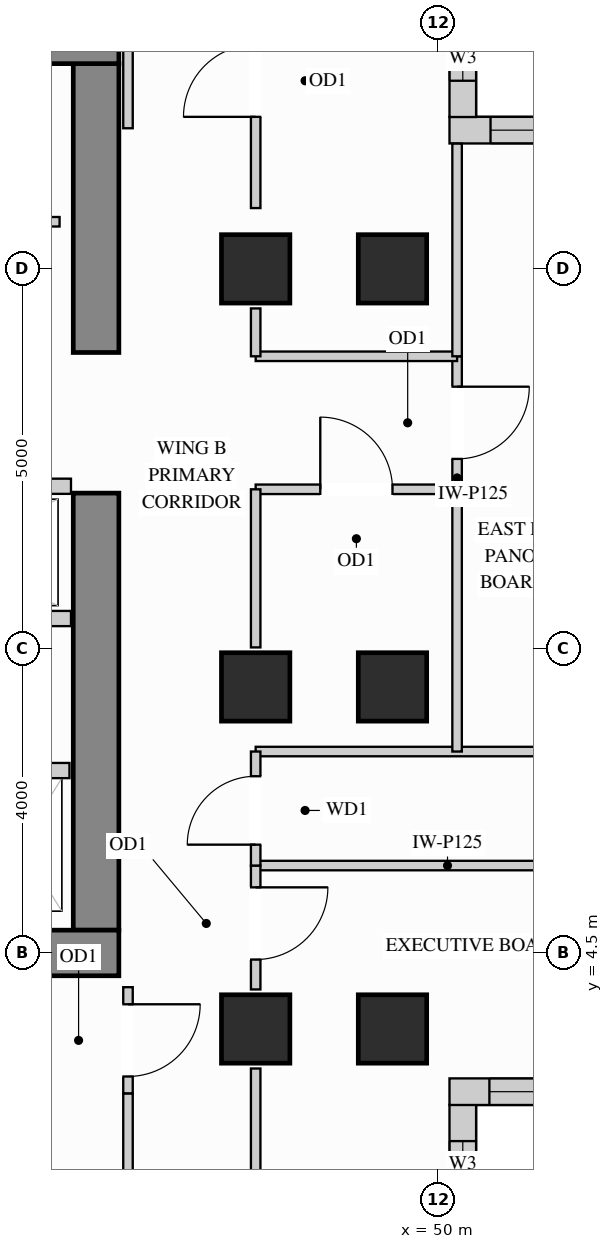
"""IFC4 building model, lengths in metres.
Left out: names, types, materials, properties, quantities, classifications, styles, units other than length and angle.
Written with IfcOpenShell. Run it as: python <this file> out.ifc"""

import sys

from ifc_helpers import new_model, si_unit, direction, frame, frame_2d, origin, origin_2d, place, context, subcontext, project, spatial, rectangle, extrude, source, transform, mapped, element, fill, save


model = new_model("IFC4")
c1 = context("Model", 3, precision=1e-05, world=origin(), true_north=direction((0.0, 1.0)))
c2 = subcontext(c1, "Body", "Model", "MODEL_VIEW")
j1 = project(units=[si_unit("LENGTHUNIT", "METRE"), si_unit("PLANEANGLEUNIT", "RADIAN")], contexts=[c1])
p1 = place(None, origin())
s1 = spatial("IfcSite", under=j1, at=p1, CompositionType="ELEMENT")
p2 = place(p1, origin())
s2 = spatial("IfcBuilding", under=s1, at=p2, CompositionType="ELEMENT")
p3 = place(p2, frame((0.0, 0.0, 146.7)))
s3 = spatial("IfcBuildingStorey", under=s2, at=p3, CompositionType="ELEMENT", Elevation=146.7)
m1 = source(origin(), c2, "Body", "SweptSolid", [
    extrude(rectangle(XDim=0.9, YDim=0.9, at=origin_2d()), origin(), (0.0, 0.0, 1.0), 3.4),
])
for number, where, z_axis, x_axis in (
    (1, (47.6, 13.5, 0.0), (0.0, 0.0, 1.0), (1.0, 0.0, 0.0)),
    (2, (47.6, 3.5, 0.0), (0.0, 0.0, 1.0), (1.0, 0.0, 0.0)),
    (3, (47.6, 8.0, 0.0), (0.0, 0.0, 1.0), (1.0, 0.0, 0.0)),
    (4, (49.4, 13.5, 0.0), (0.0, 0.0, 1.0), (1.0, 0.0, 0.0)),
    (5, (49.4, 3.5, 0.0), (0.0, 0.0, 1.0), (1.0, 0.0, 0.0)),
    (6, (49.4, 8.0, 0.0), (0.0, 0.0, 1.0), (1.0, 0.0, 0.0)),
):
    element("IfcColumn", number, at=place(p3, frame(where, z_axis=z_axis, x_axis=x_axis)), inside=s3, PredefinedType="COLUMN", context=c2, shape_type="MappedRepresentation", body=[
        mapped(m1, transform((0.0, 0.0, 0.0), x_axis=(1.0, 0.0, 0.0), y_axis=(0.0, 1.0, 0.0), z_axis=(0.0, 0.0, 1.0))),
    ])
m2 = source(origin(), c2, "Body", "SweptSolid", [
    extrude(rectangle(XDim=5.75, YDim=0.6, at=frame_2d((2.875, 0.0))), origin(), (0.0, 0.0, 1.0), 3.4),
])
p4 = place(p3, frame((45.5, 4.8, 0.0), z_axis=(0.0, 0.0, 1.0), x_axis=(0.0, 1.0, 0.0)))
e7 = element("IfcWall", 7, at=p4, inside=s3, PredefinedType="SHEAR", context=c2, shape_type="MappedRepresentation", body=[
    mapped(m2, transform((0.0, 0.0, 0.0), x_axis=(1.0, 0.0, 0.0), y_axis=(0.0, 1.0, 0.0), z_axis=(0.0, 0.0, 1.0))),
])
m3 = source(origin(), c2, "Body", "SweptSolid", [
    extrude(rectangle(XDim=3.8, YDim=0.6, at=frame_2d((1.9, 0.0))), origin(), (0.0, 0.0, 1.0), 3.4),
])
p5 = place(p3, frame((45.5, 12.4, 0.0), z_axis=(0.0, 0.0, 1.0), x_axis=(0.0, 1.0, 0.0)))
e8 = element("IfcWall", 8, at=p5, inside=s3, PredefinedType="SHEAR", context=c2, shape_type="MappedRepresentation", body=[
    mapped(m3, transform((0.0, 0.0, 0.0), x_axis=(1.0, 0.0, 0.0), y_axis=(0.0, 1.0, 0.0), z_axis=(0.0, 0.0, 1.0))),
])
m4 = source(origin(), c2, "Body", "SweptSolid", [
    extrude(rectangle(XDim=10.1, YDim=0.6, at=frame_2d((5.05, 0.0))), origin(), (0.0, 0.0, 1.0), 3.4),
])
for number, where, z_axis, x_axis in (
    (9, (35.7, 16.5, 0.0), (0.0, 0.0, 1.0), (1.0, 0.0, 0.0)),
    (10, (35.7, 4.5, 0.0), (0.0, 0.0, 1.0), (1.0, 0.0, 0.0)),
):
    element("IfcWall", number, at=place(p3, frame(where, z_axis=z_axis, x_axis=x_axis)), inside=s3, PredefinedType="SHEAR", context=c2, shape_type="MappedRepresentation", body=[
        mapped(m4, transform((0.0, 0.0, 0.0), x_axis=(1.0, 0.0, 0.0), y_axis=(0.0, 1.0, 0.0), z_axis=(0.0, 0.0, 1.0))),
    ])
p6 = place(p3, frame((50.325, 0.348, 0.0), z_axis=(0.0, 0.0, 1.0), x_axis=(0.0, 1.0, 0.0)))
e11 = element("IfcWall", 11, at=p6, inside=s3, PredefinedType="SOLIDWALL", context=c2, shape_type="SweptSolid", body=[
    extrude(rectangle(XDim=2.154, YDim=0.35, at=frame_2d((1.077, 0.0))), origin(), (0.0, 0.0, 1.0), 3.385),
])
p7 = place(p6, frame((0.477, 0.0, 0.78)))
e12 = element("IfcOpeningElement", 12, at=p7, cuts=e11, PredefinedType="OPENING", context=c2, shape_type="SweptSolid", body=[
    extrude(rectangle(XDim=1.2, YDim=2.1, at=frame_2d((0.6, 1.05))), frame((0.0, 0.185, 0.0), z_axis=(0.0, -1.0, 0.0), x_axis=(1.0, 0.0, 0.0)), (0.0, 0.0, 1.0), 0.37),
])
p8 = place(p3, frame((50.15, 2.675, 0.0), z_axis=(0.0, 0.0, 1.0), x_axis=(1.0, 0.0, 0.0)))
e13 = element("IfcWall", 13, at=p8, inside=s3, PredefinedType="SOLIDWALL", context=c2, shape_type="SweptSolid", body=[
    extrude(rectangle(XDim=2.85, YDim=0.35, at=frame_2d((1.425, 0.0))), origin(), (0.0, 0.0, 1.0), 3.385),
])
p9 = place(p8, frame((0.525, 0.0, 0.78)))
e14 = element("IfcOpeningElement", 14, at=p9, cuts=e13, PredefinedType="OPENING", context=c2, shape_type="SweptSolid", body=[
    extrude(rectangle(XDim=1.8, YDim=2.1, at=frame_2d((0.9, 1.05))), frame((0.0, 0.185, 0.0), z_axis=(0.0, -1.0, 0.0), x_axis=(1.0, 0.0, 0.0)), (0.0, 0.0, 1.0), 0.37),
])
p10 = place(p3, frame((53.0, 15.325, 0.0), z_axis=(0.0, 0.0, 1.0), x_axis=(-1.0, 0.0, 0.0)))
e15 = element("IfcWall", 15, at=p10, inside=s3, PredefinedType="SOLIDWALL", context=c2, shape_type="SweptSolid", body=[
    extrude(rectangle(XDim=2.85, YDim=0.35, at=frame_2d((1.425, 0.0))), origin(), (0.0, 0.0, 1.0), 3.385),
])
p11 = place(p10, frame((0.51, 0.0, 0.78)))
e16 = element("IfcOpeningElement", 16, at=p11, cuts=e15, PredefinedType="OPENING", context=c2, shape_type="SweptSolid", body=[
    extrude(rectangle(XDim=1.8, YDim=2.1, at=frame_2d((0.9, 1.05))), frame((0.0, 0.185, 0.0), z_axis=(0.0, -1.0, 0.0), x_axis=(1.0, 0.0, 0.0)), (0.0, 0.0, 1.0), 0.37),
])
p12 = place(p3, frame((50.325, 15.498, 0.0), z_axis=(0.0, 0.0, 1.0), x_axis=(0.0, 1.0, 0.0)))
e17 = element("IfcWall", 17, at=p12, inside=s3, PredefinedType="SOLIDWALL", context=c2, shape_type="SweptSolid", body=[
    extrude(rectangle(XDim=2.154, YDim=0.35, at=frame_2d((1.077, 0.0))), origin(), (0.0, 0.0, 1.0), 3.385),
])
p13 = place(p12, frame((0.477, 0.0, 0.78)))
e18 = element("IfcOpeningElement", 18, at=p13, cuts=e17, PredefinedType="OPENING", context=c2, shape_type="SweptSolid", body=[
    extrude(rectangle(XDim=1.2, YDim=2.1, at=frame_2d((0.6, 1.05))), frame((0.0, 0.185, 0.0), z_axis=(0.0, -1.0, 0.0), x_axis=(1.0, 0.0, 0.0)), (0.0, 0.0, 1.0), 0.37),
])
p14 = place(p3, frame((36.5, 14.12, 0.0), z_axis=(0.0, 0.0, 1.0), x_axis=(1.0, 0.0, 0.0)))
e19 = element("IfcWall", 19, at=p14, inside=s3, PredefinedType="PARTITIONING", context=c2, shape_type="SweptSolid", body=[
    extrude(rectangle(XDim=8.52, YDim=0.125, at=frame_2d((4.26, 0.0))), origin(), (0.0, 0.0, 1.0), 3.385),
])
p15 = place(p14, frame((3.785, 0.0, 0.0)))
e20 = element("IfcOpeningElement", 20, at=p15, cuts=e19, PredefinedType="OPENING", context=c2, shape_type="SweptSolid", body=[
    extrude(rectangle(XDim=0.95, YDim=2.15, at=frame_2d((0.475, 1.075))), frame((0.0, 0.073, 0.0), z_axis=(0.0, -1.0, 0.0), x_axis=(1.0, 0.0, 0.0)), (0.0, 0.0, 1.0), 0.145),
])
p16 = place(p3, frame((50.25, 10.6, 0.0), z_axis=(0.0, 0.0, 1.0), x_axis=(0.0, 1.0, 0.0)))
e21 = element("IfcWall", 21, at=p16, inside=s3, PredefinedType="PARTITIONING", context=c2, shape_type="SweptSolid", body=[
    extrude(rectangle(XDim=1.75, YDim=0.125, at=frame_2d((0.875, 0.0))), origin(), (0.0, 0.0, 1.0), 3.385),
])
p17 = place(p16, frame((0.4, 0.0, 0.0)))
e22 = element("IfcOpeningElement", 22, at=p17, cuts=e21, PredefinedType="OPENING", context=c2, shape_type="SweptSolid", body=[
    extrude(rectangle(XDim=0.95, YDim=2.15, at=frame_2d((0.475, 1.075))), frame((0.0, 0.073, 0.0), z_axis=(0.0, -1.0, 0.0), x_axis=(1.0, 0.0, 0.0)), (0.0, 0.0, 1.0), 0.145),
])
m5 = source(origin(), c2, "Body", "SweptSolid", [
    extrude(rectangle(XDim=5.048, YDim=0.125, at=frame_2d((2.524, 0.0))), origin(), (0.0, 0.0, 1.0), 3.385),
])
for number, where, z_axis, x_axis in (
    (23, (47.6, 5.65, 0.0), (0.0, 0.0, 1.0), (1.0, 0.0, 0.0)),
    (24, (47.6, 7.15, 0.0), (0.0, 0.0, 1.0), (1.0, 0.0, 0.0)),
):
    element("IfcWall", number, at=place(p3, frame(where, z_axis=z_axis, x_axis=x_axis)), inside=s3, PredefinedType="PARTITIONING", context=c2, shape_type="MappedRepresentation", body=[
        mapped(m5, transform((0.0, 0.0, 0.0), x_axis=(1.0, 0.0, 0.0), y_axis=(0.0, 1.0, 0.0), z_axis=(0.0, 0.0, 1.0))),
    ])
m6 = source(origin(), c2, "Body", "SweptSolid", [
    extrude(rectangle(XDim=2.65, YDim=0.125, at=frame_2d((1.325, 0.0))), origin(), (0.0, 0.0, 1.0), 3.385),
])
p18 = place(p3, frame((47.6, 12.35, 0.0), z_axis=(0.0, 0.0, 1.0), x_axis=(1.0, 0.0, 0.0)))
e25 = element("IfcWall", 25, at=p18, inside=s3, PredefinedType="PARTITIONING", context=c2, shape_type="MappedRepresentation", body=[
    mapped(m6, transform((0.0, 0.0, 0.0), x_axis=(1.0, 0.0, 0.0), y_axis=(0.0, 1.0, 0.0), z_axis=(0.0, 0.0, 1.0))),
])
p19 = place(p3, frame((47.6, 10.6, 0.0), z_axis=(0.0, 0.0, 1.0), x_axis=(1.0, 0.0, 0.0)))
e26 = element("IfcWall", 26, at=p19, inside=s3, PredefinedType="PARTITIONING", context=c2, shape_type="SweptSolid", body=[
    extrude(rectangle(XDim=2.65, YDim=0.125, at=frame_2d((1.325, 0.0))), origin(), (0.0, 0.0, 1.0), 2.773),
])
p20 = place(p19, frame((0.85, 0.0, 0.0)))
e27 = element("IfcOpeningElement", 27, at=p20, cuts=e26, PredefinedType="OPENING", context=c2, shape_type="SweptSolid", body=[
    extrude(rectangle(XDim=0.95, YDim=2.15, at=frame_2d((0.475, 1.075))), frame((0.0, 0.073, 0.0), z_axis=(0.0, -1.0, 0.0), x_axis=(1.0, 0.0, 0.0)), (0.0, 0.0, 1.0), 0.145),
])
m7 = source(origin(), c2, "Body", "SweptSolid", [
    extrude(rectangle(XDim=3.45, YDim=0.125, at=frame_2d((1.725, 0.0))), origin(), (0.0, 0.0, 1.0), 3.385),
])
p21 = place(p3, frame((50.25, 7.15, 0.0), z_axis=(0.0, 0.0, 1.0), x_axis=(0.0, 1.0, 0.0)))
e28 = element("IfcWall", 28, at=p21, inside=s3, PredefinedType="PARTITIONING", context=c2, shape_type="MappedRepresentation", body=[
    mapped(m7, transform((0.0, 0.0, 0.0), x_axis=(1.0, 0.0, 0.0), y_axis=(0.0, 1.0, 0.0), z_axis=(0.0, 0.0, 1.0))),
])
m8 = source(origin(), c2, "Body", "SweptSolid", [
    extrude(rectangle(XDim=2.798, YDim=0.125, at=frame_2d((1.399, 0.0))), origin(), (0.0, 0.0, 1.0), 3.385),
])
p22 = place(p3, frame((50.25, 12.35, 0.0), z_axis=(0.0, 0.0, 1.0), x_axis=(0.0, 1.0, 0.0)))
e29 = element("IfcWall", 29, at=p22, inside=s3, PredefinedType="PARTITIONING", context=c2, shape_type="MappedRepresentation", body=[
    mapped(m8, transform((0.0, 0.0, 0.0), x_axis=(1.0, 0.0, 0.0), y_axis=(0.0, 1.0, 0.0), z_axis=(0.0, 0.0, 1.0))),
])
p23 = place(p3, frame((47.6, 4.02, 0.0), z_axis=(0.0, 0.0, 1.0), x_axis=(0.0, 1.0, 0.0)))
e30 = element("IfcWall", 30, at=p23, inside=s3, PredefinedType="PARTITIONING", context=c2, shape_type="SweptSolid", body=[
    extrude(rectangle(XDim=1.63, YDim=0.125, at=frame_2d((0.815, 0.0))), origin(), (0.0, 0.0, 1.0), 2.773),
])
p24 = place(p23, frame((0.393, 0.0, 0.0)))
e31 = element("IfcOpeningElement", 31, at=p24, cuts=e30, PredefinedType="OPENING", context=c2, shape_type="SweptSolid", body=[
    extrude(rectangle(XDim=0.95, YDim=2.15, at=frame_2d((0.475, 1.075))), frame((0.0, 0.073, 0.0), z_axis=(0.0, -1.0, 0.0), x_axis=(1.0, 0.0, 0.0)), (0.0, 0.0, 1.0), 0.145),
])
m9 = source(origin(), c2, "Body", "SweptSolid", [
    extrude(rectangle(XDim=1.86, YDim=0.125, at=frame_2d((0.93, 0.0))), origin(), (0.0, 0.0, 1.0), 2.773),
])
p25 = place(p3, frame((47.6, 1.12, 0.0), z_axis=(0.0, 0.0, 1.0), x_axis=(0.0, 1.0, 0.0)))
e32 = element("IfcWall", 32, at=p25, inside=s3, PredefinedType="PARTITIONING", context=c2, shape_type="MappedRepresentation", body=[
    mapped(m9, transform((0.0, 0.0, 0.0), x_axis=(1.0, 0.0, 0.0), y_axis=(0.0, 1.0, 0.0), z_axis=(0.0, 0.0, 1.0))),
])
m10 = source(origin(), c2, "Body", "SweptSolid", [
    extrude(rectangle(XDim=2.08, YDim=0.125, at=frame_2d((1.04, 0.0))), origin(), (0.0, 0.0, 1.0), 2.773),
])
p26 = place(p3, frame((47.6, 8.52, 0.0), z_axis=(0.0, 0.0, 1.0), x_axis=(0.0, 1.0, 0.0)))
e33 = element("IfcWall", 33, at=p26, inside=s3, PredefinedType="PARTITIONING", context=c2, shape_type="MappedRepresentation", body=[
    mapped(m10, transform((0.0, 0.0, 0.0), x_axis=(1.0, 0.0, 0.0), y_axis=(0.0, 1.0, 0.0), z_axis=(0.0, 0.0, 1.0))),
])
p27 = place(p3, frame((47.6, 14.3, 0.0), z_axis=(0.0, 0.0, 1.0), x_axis=(0.0, 1.0, 0.0)))
e34 = element("IfcWall", 34, at=p27, inside=s3, PredefinedType="PARTITIONING", context=c2, shape_type="SweptSolid", body=[
    extrude(rectangle(XDim=2.58, YDim=0.125, at=frame_2d((1.29, 0.0))), origin(), (0.0, 0.0, 1.0), 2.773),
])
p28 = place(p27, frame((1.2, 0.0, 0.0)))
e35 = element("IfcOpeningElement", 35, at=p28, cuts=e34, PredefinedType="OPENING", context=c2, shape_type="SweptSolid", body=[
    extrude(rectangle(XDim=0.95, YDim=2.15, at=frame_2d((0.475, 1.075))), frame((0.0, 0.073, 0.0), z_axis=(0.0, -1.0, 0.0), x_axis=(1.0, 0.0, 0.0)), (0.0, 0.0, 1.0), 0.145),
])
m11 = source(origin(), c2, "Body", "SweptSolid", [
    extrude(rectangle(XDim=0.63, YDim=0.125, at=frame_2d((0.315, 0.0))), origin(), (0.0, 0.0, 1.0), 2.773),
])
p29 = place(p3, frame((47.6, 12.35, 0.0), z_axis=(0.0, 0.0, 1.0), x_axis=(0.0, 1.0, 0.0)))
e36 = element("IfcWall", 36, at=p29, inside=s3, PredefinedType="PARTITIONING", context=c2, shape_type="MappedRepresentation", body=[
    mapped(m11, transform((0.0, 0.0, 0.0), x_axis=(1.0, 0.0, 0.0), y_axis=(0.0, 1.0, 0.0), z_axis=(0.0, 0.0, 1.0))),
])
p30 = place(p3, frame((47.6, 5.65, 0.0), z_axis=(0.0, 0.0, 1.0), x_axis=(0.0, 1.0, 0.0)))
e37 = element("IfcWall", 37, at=p30, inside=s3, PredefinedType="PARTITIONING", context=c2, shape_type="SweptSolid", body=[
    extrude(rectangle(XDim=1.5, YDim=0.125, at=frame_2d((0.75, 0.0))), origin(), (0.0, 0.0, 1.0), 2.773),
])
p31 = place(p30, frame((0.275, 0.0, 0.0)))
e38 = element("IfcOpeningElement", 38, at=p31, cuts=e37, PredefinedType="OPENING", context=c2, shape_type="SweptSolid", body=[
    extrude(rectangle(XDim=0.9, YDim=2.15, at=frame_2d((0.45, 1.075))), frame((0.0, 0.073, 0.0), z_axis=(0.0, -1.0, 0.0), x_axis=(1.0, 0.0, 0.0)), (0.0, 0.0, 1.0), 0.145),
])
m12 = source(origin(), c2, "Body", "SweptSolid", [
    extrude(rectangle(XDim=2.298, YDim=0.125, at=frame_2d((1.149, 0.0))), origin(), (0.0, 0.0, 1.0), 3.385),
])
p32 = place(p3, frame((45.92, 15.35, 0.0), z_axis=(0.0, 0.0, 1.0), x_axis=(0.0, 1.0, 0.0)))
e39 = element("IfcWall", 39, at=p32, inside=s3, PredefinedType="PARTITIONING", context=c2, shape_type="MappedRepresentation", body=[
    mapped(m12, transform((0.0, 0.0, 0.0), x_axis=(1.0, 0.0, 0.0), y_axis=(0.0, 1.0, 0.0), z_axis=(0.0, 0.0, 1.0))),
])
p33 = place(p3, frame((45.92, 2.65, 0.0), z_axis=(0.0, 0.0, 1.0), x_axis=(0.0, 1.0, 0.0)))
e40 = element("IfcWall", 40, at=p33, inside=s3, PredefinedType="PARTITIONING", context=c2, shape_type="SweptSolid", body=[
    extrude(rectangle(XDim=1.4, YDim=0.125, at=frame_2d((0.7, 0.0))), origin(), (0.0, 0.0, 1.0), 3.385),
])
p34 = place(p33, frame((0.225, 0.0, 0.0)))
e41 = element("IfcOpeningElement", 41, at=p34, cuts=e40, PredefinedType="OPENING", context=c2, shape_type="SweptSolid", body=[
    extrude(rectangle(XDim=0.95, YDim=2.15, at=frame_2d((0.475, 1.075))), frame((0.0, 0.073, 0.0), z_axis=(0.0, -1.0, 0.0), x_axis=(1.0, 0.0, 0.0)), (0.0, 0.0, 1.0), 0.145),
])
p35 = place(p3, frame((45.92, 0.352, 0.0), z_axis=(0.0, 0.0, 1.0), x_axis=(0.0, 1.0, 0.0)))
e42 = element("IfcWall", 42, at=p35, inside=s3, PredefinedType="PARTITIONING", context=c2, shape_type="MappedRepresentation", body=[
    mapped(m12, transform((0.0, 0.0, 0.0), x_axis=(1.0, 0.0, 0.0), y_axis=(0.0, 1.0, 0.0), z_axis=(0.0, 0.0, 1.0))),
])
m13 = source(origin(), c2, "Body", "SweptSolid", [
    extrude(rectangle(XDim=1.3, YDim=0.2, at=frame_2d((0.65, 0.0))), origin(), (0.0, 0.0, 1.0), 3.385),
])
p36 = place(p3, frame((43.85, 6.9, 0.0), z_axis=(0.0, 0.0, 1.0), x_axis=(1.0, 0.0, 0.0)))
e43 = element("IfcWall", 43, at=p36, inside=s3, PredefinedType="PARTITIONING", context=c2, shape_type="MappedRepresentation", body=[
    mapped(m13, transform((0.0, 0.0, 0.0), x_axis=(1.0, 0.0, 0.0), y_axis=(0.0, 1.0, 0.0), z_axis=(0.0, 0.0, 1.0))),
])
m14 = source(origin(), c2, "Body", "SweptSolid", [
    extrude(rectangle(XDim=3.49, YDim=0.2, at=frame_2d((1.745, 0.0))), origin(), (0.0, 0.0, 1.0), 3.385),
])
for number, where, z_axis, x_axis in (
    (44, (41.68, 10.64, 0.0), (0.0, 0.0, 1.0), (1.0, 0.0, 0.0)),
    (45, (41.68, 8.9, 0.0), (0.0, 0.0, 1.0), (1.0, 0.0, 0.0)),
):
    element("IfcWall", number, at=place(p3, frame(where, z_axis=z_axis, x_axis=x_axis)), inside=s3, PredefinedType="PARTITIONING", context=c2, shape_type="MappedRepresentation", body=[
        mapped(m14, transform((0.0, 0.0, 0.0), x_axis=(1.0, 0.0, 0.0), y_axis=(0.0, 1.0, 0.0), z_axis=(0.0, 0.0, 1.0))),
    ])
m15 = source(origin(), c2, "Body", "SweptSolid", [
    extrude(rectangle(XDim=0.95, YDim=2.15, at=frame_2d((0.475, 1.075))), frame((0.0, 0.025, 0.0), z_axis=(0.0, -1.0, 0.0), x_axis=(1.0, 0.0, 0.0)), (0.0, 0.0, 1.0), 0.05),
])
p37 = place(p34, origin())
e46 = element("IfcDoor", 46, at=p37, inside=s3, OperationType="SINGLE_SWING_RIGHT", PredefinedType="DOOR", context=c2, shape_type="MappedRepresentation", body=[
    mapped(m15, transform((0.0, 0.0, 0.0), x_axis=(1.0, 0.0, 0.0), y_axis=(0.0, 1.0, 0.0), z_axis=(0.0, 0.0, 1.0))),
])
fill(e41, e46)
p38 = place(p24, origin())
e47 = element("IfcDoor", 47, at=p38, inside=s3, OperationType="SINGLE_SWING_RIGHT", PredefinedType="DOOR", context=c2, shape_type="MappedRepresentation", body=[
    mapped(m15, transform((0.0, 0.0, 0.0), x_axis=(1.0, 0.0, 0.0), y_axis=(0.0, 1.0, 0.0), z_axis=(0.0, 0.0, 1.0))),
])
fill(e31, e47)
p39 = place(p20, origin())
e48 = element("IfcDoor", 48, at=p39, inside=s3, OperationType="SINGLE_SWING_LEFT", PredefinedType="DOOR", context=c2, shape_type="MappedRepresentation", body=[
    mapped(m15, transform((0.0, 0.0, 0.0), x_axis=(1.0, 0.0, 0.0), y_axis=(0.0, 1.0, 0.0), z_axis=(0.0, 0.0, 1.0))),
])
fill(e27, e48)
p40 = place(p17, origin())
e49 = element("IfcDoor", 49, at=p40, inside=s3, OperationType="SINGLE_SWING_RIGHT", PredefinedType="DOOR", context=c2, shape_type="MappedRepresentation", body=[
    mapped(m15, transform((0.0, 0.0, 0.0), x_axis=(1.0, 0.0, 0.0), y_axis=(0.0, 1.0, 0.0), z_axis=(0.0, 0.0, 1.0))),
])
fill(e22, e49)
p41 = place(p28, origin())
e50 = element("IfcDoor", 50, at=p41, inside=s3, OperationType="SINGLE_SWING_LEFT", PredefinedType="DOOR", context=c2, shape_type="MappedRepresentation", body=[
    mapped(m15, transform((0.0, 0.0, 0.0), x_axis=(1.0, 0.0, 0.0), y_axis=(0.0, 1.0, 0.0), z_axis=(0.0, 0.0, 1.0))),
])
fill(e35, e50)
m16 = source(origin(), c2, "Body", "SweptSolid", [
    extrude(rectangle(XDim=0.9, YDim=2.15, at=frame_2d((0.45, 1.075))), frame((0.0, 0.025, 0.0), z_axis=(0.0, -1.0, 0.0), x_axis=(1.0, 0.0, 0.0)), (0.0, 0.0, 1.0), 0.05),
])
p42 = place(p31, origin())
e51 = element("IfcDoor", 51, at=p42, inside=s3, OperationType="SINGLE_SWING_LEFT", PredefinedType="DOOR", context=c2, shape_type="MappedRepresentation", body=[
    mapped(m16, transform((0.0, 0.0, 0.0), x_axis=(1.0, 0.0, 0.0), y_axis=(0.0, 1.0, 0.0), z_axis=(0.0, 0.0, 1.0))),
])
fill(e38, e51)
m17 = source(origin(), c2, "Body", "SweptSolid", [
    extrude(rectangle(XDim=1.8, YDim=2.1, at=frame_2d((0.9, 1.05))), frame((0.0, 0.03, 0.0), z_axis=(0.0, -1.0, 0.0), x_axis=(1.0, 0.0, 0.0)), (0.0, 0.0, 1.0), 0.06),
])
p43 = place(p9, origin())
e52 = element("IfcWindow", 52, at=p43, inside=s3, PartitioningType="SINGLE_PANEL", PredefinedType="WINDOW", context=c2, shape_type="MappedRepresentation", body=[
    mapped(m17, transform((0.0, 0.0, 0.0), x_axis=(1.0, 0.0, 0.0), y_axis=(0.0, 1.0, 0.0), z_axis=(0.0, 0.0, 1.0))),
])
fill(e14, e52)
p44 = place(p11, origin())
e53 = element("IfcWindow", 53, at=p44, inside=s3, PartitioningType="SINGLE_PANEL", PredefinedType="WINDOW", context=c2, shape_type="MappedRepresentation", body=[
    mapped(m17, transform((0.0, 0.0, 0.0), x_axis=(1.0, 0.0, 0.0), y_axis=(0.0, 1.0, 0.0), z_axis=(0.0, 0.0, 1.0))),
])
fill(e16, e53)
m18 = source(origin(), c2, "Body", "SweptSolid", [
    extrude(rectangle(XDim=1.2, YDim=2.1, at=frame_2d((0.6, 1.05))), frame((0.0, 0.03, 0.0), z_axis=(0.0, -1.0, 0.0), x_axis=(1.0, 0.0, 0.0)), (0.0, 0.0, 1.0), 0.06),
])
p45 = place(p7, origin())
e54 = element("IfcWindow", 54, at=p45, inside=s3, PartitioningType="SINGLE_PANEL", PredefinedType="WINDOW", context=c2, shape_type="MappedRepresentation", body=[
    mapped(m18, transform((0.0, 0.0, 0.0), x_axis=(1.0, 0.0, 0.0), y_axis=(0.0, 1.0, 0.0), z_axis=(0.0, 0.0, 1.0))),
])
fill(e12, e54)
p46 = place(p13, origin())
e55 = element("IfcWindow", 55, at=p46, inside=s3, PartitioningType="SINGLE_PANEL", PredefinedType="WINDOW", context=c2, shape_type="MappedRepresentation", body=[
    mapped(m18, transform((0.0, 0.0, 0.0), x_axis=(1.0, 0.0, 0.0), y_axis=(0.0, 1.0, 0.0), z_axis=(0.0, 0.0, 1.0))),
])
fill(e18, e55)
save(model, sys.argv[1])
